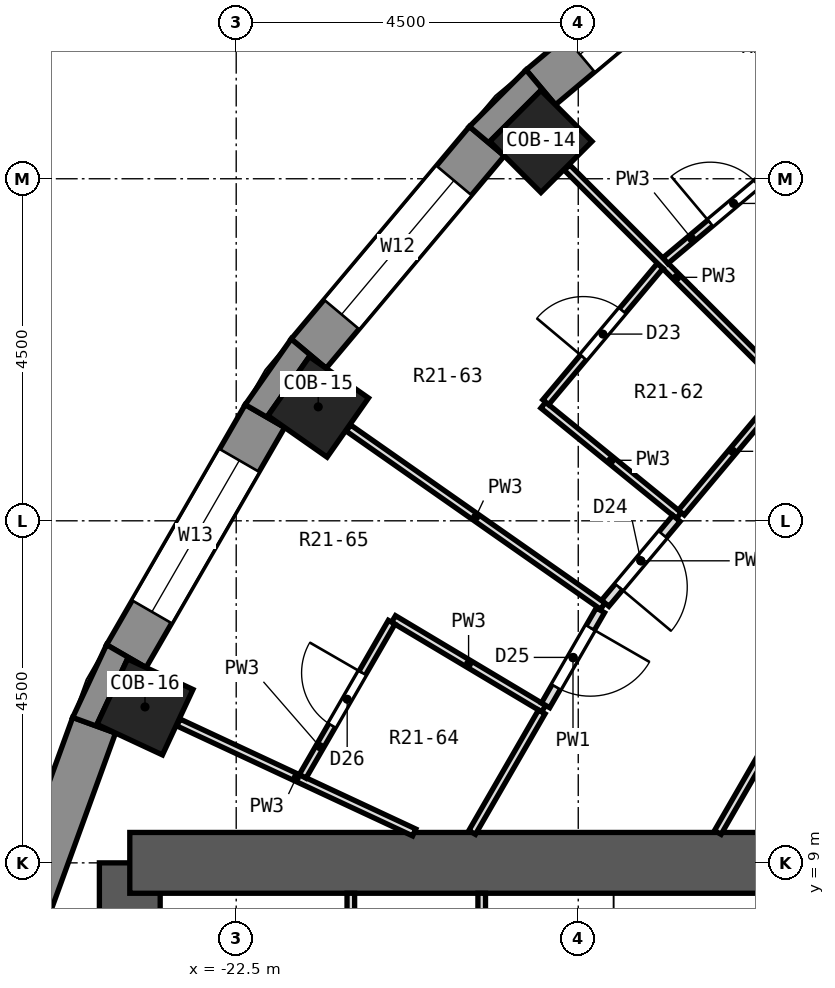
"""IFC4 building model, lengths in metres.
Left out: names, types, materials, properties, quantities, classifications, styles, units other than length and angle.
Written with IfcOpenShell. Run it as: python <this file> out.ifc"""

import sys

from ifc_helpers import new_model, si_unit, direction, frame, frame_2d, origin, origin_2d, place, context, subcontext, project, spatial, polyline, rectangle, outline, extrude, element, fill, save


model = new_model("IFC4")
c1 = context("Model", 3, precision=1e-05, world=origin(), true_north=direction((0.0, 1.0)))
c2 = subcontext(c1, "Body", "Model", "MODEL_VIEW")
j1 = project(units=[si_unit("LENGTHUNIT", "METRE"), si_unit("PLANEANGLEUNIT", "RADIAN")], contexts=[c1])
p1 = place(None, origin())
s1 = spatial("IfcSite", under=j1, at=p1, CompositionType="ELEMENT")
p2 = place(p1, origin())
s2 = spatial("IfcBuilding", under=s1, at=p2, CompositionType="ELEMENT")
p3 = place(p2, frame((0.0, 0.0, 131.5)))
s3 = spatial("IfcBuildingStorey", under=s2, at=p3, CompositionType="ELEMENT", Elevation=131.5)
for number, where, z_axis, x_axis in (
    (1, (-18.491, 18.491, 0.0), (0.0, 0.0, 1.0), (-0.707, 0.707, 0.0)),
    (2, (-21.421, 14.999, 0.0), (0.0, 0.0, 1.0), (-0.819, 0.574, 0.0)),
    (3, (-23.7, 11.052, 0.0), (0.0, 0.0, 1.0), (-0.906, 0.423, 0.0)),
):
    element("IfcColumn", number, at=place(p3, frame(where, z_axis=z_axis, x_axis=x_axis)), inside=s3, PredefinedType="COLUMN", context=c2, shape_type="SweptSolid", body=[
        extrude(rectangle(XDim=0.95, YDim=0.95, at=origin_2d()), origin(), (0.0, 0.0, 1.0), 3.3),
    ])
p4 = place(p3, frame((-23.9, -9.0, 0.0), z_axis=(0.0, 0.0, 1.0), x_axis=(0.0, 1.0, 0.0)))
e4 = element("IfcWall", 4, at=p4, inside=s3, PredefinedType="SHEAR", context=c2, shape_type="SweptSolid", body=[
    extrude(rectangle(XDim=18.0, YDim=0.8, at=frame_2d((9.0, 0.0))), origin(), (0.0, 0.0, 1.0), 3.3),
])
p5 = place(p3, frame((-13.5, 9.0, 0.0), z_axis=(0.0, 0.0, 1.0), x_axis=(-1.0, 0.0, 0.0)))
e5 = element("IfcWall", 5, at=p5, inside=s3, PredefinedType="SHEAR", context=c2, shape_type="SweptSolid", body=[
    extrude(rectangle(XDim=10.4, YDim=0.8, at=frame_2d((5.2, 0.0))), origin(), (0.0, 0.0, 1.0), 3.3),
])
p6 = place(p3, frame((-15.699, 21.547, 0.0), z_axis=(0.0, 0.0, 1.0), x_axis=(-0.766055462616, -0.642774476932, 0.0)))
e6 = element("IfcWall", 6, at=p6, inside=s3, PredefinedType="SOLIDWALL", context=c2, shape_type="SweptSolid", body=[
    extrude(rectangle(XDim=3.648, YDim=0.6, at=frame_2d((1.824, 0.0))), origin(), (0.0, 0.0, 1.0), 2.8),
])
p7 = place(p6, frame((0.674, 0.0, 0.9)))
e7 = element("IfcOpeningElement", 7, at=p7, cuts=e6, PredefinedType="OPENING", context=c2, shape_type="SweptSolid", body=[
    extrude(rectangle(XDim=2.3, YDim=1.8, at=frame_2d((1.15, 0.9))), frame((0.0, 0.312, 0.0), z_axis=(0.0, -1.0, 0.0), x_axis=(1.0, 0.0, 0.0)), (0.0, 0.0, 1.0), 0.624),
])
p8 = place(p3, frame((-19.202, 18.494, 0.0), z_axis=(0.0, 0.0, 1.0), x_axis=(-0.642774476932, -0.766055462616, 0.0)))
e8 = element("IfcWall", 8, at=p8, inside=s3, PredefinedType="SOLIDWALL", context=c2, shape_type="SweptSolid", body=[
    extrude(rectangle(XDim=3.648, YDim=0.6, at=frame_2d((1.824, 0.0))), origin(), (0.0, 0.0, 1.0), 2.8),
])
p9 = place(p8, frame((0.674, 0.0, 0.9)))
e9 = element("IfcOpeningElement", 9, at=p9, cuts=e8, PredefinedType="OPENING", context=c2, shape_type="SweptSolid", body=[
    extrude(rectangle(XDim=2.3, YDim=1.8, at=frame_2d((1.15, 0.9))), frame((0.0, 0.312, 0.0), z_axis=(0.0, -1.0, 0.0), x_axis=(1.0, 0.0, 0.0)), (0.0, 0.0, 1.0), 0.624),
])
p10 = place(p3, frame((-22.122, 14.878, 0.0), z_axis=(0.0, 0.0, 1.0), x_axis=(-0.499954196102, -0.866051847062, 0.0)))
e10 = element("IfcWall", 10, at=p10, inside=s3, PredefinedType="SOLIDWALL", context=c2, shape_type="SweptSolid", body=[
    extrude(rectangle(XDim=3.648, YDim=0.6, at=frame_2d((1.824, 0.0))), origin(), (0.0, 0.0, 1.0), 2.8),
])
p11 = place(p10, frame((0.674, 0.0, 0.9)))
e11 = element("IfcOpeningElement", 11, at=p11, cuts=e10, PredefinedType="OPENING", context=c2, shape_type="SweptSolid", body=[
    extrude(rectangle(XDim=2.3, YDim=1.8, at=frame_2d((1.15, 0.9))), frame((0.0, 0.312, 0.0), z_axis=(0.0, -1.0, 0.0), x_axis=(1.0, 0.0, 0.0)), (0.0, 0.0, 1.0), 0.624),
])
p12 = place(p3, frame((-24.369, 10.811, 0.0), z_axis=(0.0, 0.0, 1.0), x_axis=(-0.341990236633, -0.939703505393, 0.0)))
e12 = element("IfcWall", 12, at=p12, inside=s3, PredefinedType="SOLIDWALL", context=c2, shape_type="SweptSolid", body=[
    extrude(rectangle(XDim=3.648, YDim=0.6, at=frame_2d((1.824, 0.0))), origin(), (0.0, 0.0, 1.0), 2.8),
])
p13 = place(p3, origin())
e13 = element("IfcWall", 13, at=p13, inside=s3, PredefinedType="SOLIDWALL", context=c2, shape_type="SweptSolid", body=[
    extrude(outline(polyline([(-18.686, 19.432), (-19.432, 18.686), (-18.972, 18.301), (-19.163, 18.491), (-18.491, 19.163), (-18.301, 18.972), (-18.686, 19.432)])), origin(), (0.0, 0.0, 1.0), 2.8),
])
p14 = place(p3, origin())
e14 = element("IfcWall", 14, at=p14, inside=s3, PredefinedType="SOLIDWALL", context=c2, shape_type="SweptSolid", body=[
    extrude(outline(polyline([(-22.382, 15.028), (-21.862, 14.728), (-22.083, 14.882), (-21.538, 15.661), (-21.317, 15.506), (-21.777, 15.892), (-22.382, 15.028)])), origin(), (0.0, 0.0, 1.0), 2.8),
])
p15 = place(p3, origin())
e15 = element("IfcWall", 15, at=p15, inside=s3, PredefinedType="SOLIDWALL", context=c2, shape_type="SweptSolid", body=[
    extrude(outline(polyline([(-24.651, 10.913), (-24.087, 10.708), (-24.331, 10.822), (-23.93, 11.683), (-23.686, 11.569), (-24.206, 11.869), (-24.651, 10.913)])), origin(), (0.0, 0.0, 1.0), 2.8),
])
p16 = place(p3, frame((-18.148, 18.148, 0.0), z_axis=(0.0, 0.0, 1.0), x_axis=(0.707106781187, -0.707106781187, 0.0)))
e16 = element("IfcWall", 16, at=p16, inside=s3, PredefinedType="PARTITIONING", context=c2, shape_type="SweptSolid", body=[
    extrude(rectangle(XDim=4.085, YDim=0.1, at=frame_2d((2.043, 0.0))), origin(), (0.0, 0.0, 1.0), 2.8),
])
p17 = place(p3, frame((-18.46, 15.022, 0.0), z_axis=(0.0, 0.0, 1.0), x_axis=(0.775591007639, -0.6312357633, 0.0)))
e17 = element("IfcWall", 17, at=p17, inside=s3, PredefinedType="PARTITIONING", context=c2, shape_type="SweptSolid", body=[
    extrude(rectangle(XDim=2.3, YDim=0.1, at=frame_2d((1.15, 0.0))), origin(), (0.0, 0.0, 1.0), 2.8),
])
p18 = place(p3, frame((-21.024, 14.721, 0.0), z_axis=(0.0, 0.0, 1.0), x_axis=(0.819108383097, -0.573638785945, 0.0)))
e18 = element("IfcWall", 18, at=p18, inside=s3, PredefinedType="PARTITIONING", context=c2, shape_type="SweptSolid", body=[
    extrude(rectangle(XDim=4.086, YDim=0.1, at=frame_2d((2.043, 0.0))), origin(), (0.0, 0.0, 1.0), 2.8),
])
p19 = place(p3, frame((-20.43, 12.209, 0.0), z_axis=(0.0, 0.0, 1.0), x_axis=(0.858446574718, -0.512902991174, 0.0)))
e19 = element("IfcWall", 19, at=p19, inside=s3, PredefinedType="PARTITIONING", context=c2, shape_type="SweptSolid", body=[
    extrude(rectangle(XDim=2.301, YDim=0.1, at=frame_2d((1.15, 0.0))), origin(), (0.0, 0.0, 1.0), 2.8),
])
p20 = place(p3, frame((-23.26, 10.847, 0.0), z_axis=(0.0, 0.0, 1.0), x_axis=(0.906223222272, -0.422799564114, 0.0)))
e20 = element("IfcWall", 20, at=p20, inside=s3, PredefinedType="PARTITIONING", context=c2, shape_type="SweptSolid", body=[
    extrude(rectangle(XDim=3.423, YDim=0.1, at=frame_2d((1.711, 0.0))), origin(), (0.0, 0.0, 1.0), 2.8),
])
p21 = place(p3, frame((-16.853, 16.923, 0.0), z_axis=(0.0, 0.0, 1.0), x_axis=(0.765924716163, 0.642930267735, 0.0)))
e21 = element("IfcWall", 21, at=p21, inside=s3, PredefinedType="PARTITIONING", context=c2, shape_type="SweptSolid", body=[
    extrude(rectangle(XDim=2.34, YDim=0.1, at=frame_2d((1.17, 0.0))), origin(), (0.0, 0.0, 1.0), 2.8),
])
p22 = place(p21, frame((0.77, 0.0, 0.0)))
e22 = element("IfcOpeningElement", 22, at=p22, cuts=e21, PredefinedType="OPENING", context=c2, shape_type="SweptSolid", body=[
    extrude(rectangle(XDim=0.8, YDim=2.1, at=frame_2d((0.4, 1.05))), frame((0.0, 0.062, 0.0), z_axis=(0.0, -1.0, 0.0), x_axis=(1.0, 0.0, 0.0)), (0.0, 0.0, 1.0), 0.124),
])
p23 = place(p3, frame((-16.644, 13.608, 0.0), z_axis=(0.0, 0.0, 1.0), x_axis=(0.642715569181, 0.766104886508, 0.0)))
e23 = element("IfcWall", 23, at=p23, inside=s3, PredefinedType="PARTITIONING", context=c2, shape_type="SweptSolid", body=[
    extrude(rectangle(XDim=2.103, YDim=0.1, at=frame_2d((1.052, 0.0))), origin(), (0.0, 0.0, 1.0), 2.8),
])
p24 = place(p3, frame((-17.645, 12.415, 0.0), z_axis=(0.0, 0.0, 1.0), x_axis=(0.642669367872, 0.766143644233, 0.0)))
e24 = element("IfcWall", 24, at=p24, inside=s3, PredefinedType="PARTITIONING", context=c2, shape_type="SweptSolid", body=[
    extrude(rectangle(XDim=1.457, YDim=0.125, at=frame_2d((0.729, 0.0))), origin(), (0.0, 0.0, 1.0), 2.8),
])
p25 = place(p24, frame((0.279, 0.0, 0.0)))
e25 = element("IfcOpeningElement", 25, at=p25, cuts=e24, PredefinedType="OPENING", context=c2, shape_type="SweptSolid", body=[
    extrude(rectangle(XDim=0.9, YDim=2.1, at=frame_2d((0.45, 1.05))), frame((0.0, 0.074, 0.0), z_axis=(0.0, -1.0, 0.0), x_axis=(1.0, 0.0, 0.0)), (0.0, 0.0, 1.0), 0.149),
])
p26 = place(p3, frame((-18.428, 15.06, 0.0), z_axis=(0.0, 0.0, 1.0), x_axis=(0.642930267735, 0.765924716163, 0.0)))
e26 = element("IfcWall", 26, at=p26, inside=s3, PredefinedType="PARTITIONING", context=c2, shape_type="SweptSolid", body=[
    extrude(rectangle(XDim=2.34, YDim=0.1, at=frame_2d((1.17, 0.0))), origin(), (0.0, 0.0, 1.0), 2.8),
])
p27 = place(p26, frame((0.77, 0.0, 0.0)))
e27 = element("IfcOpeningElement", 27, at=p27, cuts=e26, PredefinedType="OPENING", context=c2, shape_type="SweptSolid", body=[
    extrude(rectangle(XDim=0.8, YDim=2.1, at=frame_2d((0.4, 1.05))), frame((0.0, 0.062, 0.0), z_axis=(0.0, -1.0, 0.0), x_axis=(1.0, 0.0, 0.0)), (0.0, 0.0, 1.0), 0.124),
])
p28 = place(p3, frame((-16.164, 9.4, 0.0), z_axis=(0.0, 0.0, 1.0), x_axis=(0.499750133086, 0.866169616461, 0.0)))
e28 = element("IfcWall", 28, at=p28, inside=s3, PredefinedType="PARTITIONING", context=c2, shape_type="SweptSolid", body=[
    extrude(rectangle(XDim=1.527, YDim=0.1, at=frame_2d((0.764, 0.0))), origin(), (0.0, 0.0, 1.0), 2.8),
])
p29 = place(p3, frame((-19.396, 9.4, 0.0), z_axis=(0.0, 0.0, 1.0), x_axis=(0.500210961829, 0.865903570651, 0.0)))
e29 = element("IfcWall", 29, at=p29, inside=s3, PredefinedType="PARTITIONING", context=c2, shape_type="SweptSolid", body=[
    extrude(rectangle(XDim=1.831, YDim=0.1, at=frame_2d((0.916, 0.0))), origin(), (0.0, 0.0, 1.0), 2.8),
])
p30 = place(p3, frame((-18.43, 11.072, 0.0), z_axis=(0.0, 0.0, 1.0), x_axis=(0.499849317439, 0.866112382925, 0.0)))
e30 = element("IfcWall", 30, at=p30, inside=s3, PredefinedType="PARTITIONING", context=c2, shape_type="SweptSolid", body=[
    extrude(rectangle(XDim=1.444, YDim=0.125, at=frame_2d((0.722, 0.0))), origin(), (0.0, 0.0, 1.0), 2.8),
])
p31 = place(p30, frame((0.278, 0.0, 0.0)))
e31 = element("IfcOpeningElement", 31, at=p31, cuts=e30, PredefinedType="OPENING", context=c2, shape_type="SweptSolid", body=[
    extrude(rectangle(XDim=0.9, YDim=2.1, at=frame_2d((0.45, 1.05))), frame((0.0, 0.074, 0.0), z_axis=(0.0, -1.0, 0.0), x_axis=(1.0, 0.0, 0.0)), (0.0, 0.0, 1.0), 0.149),
])
p32 = place(p3, frame((-21.625, 10.139, 0.0), z_axis=(0.0, 0.0, 1.0), x_axis=(0.499999433879, 0.866025730634, 0.0)))
e32 = element("IfcWall", 32, at=p32, inside=s3, PredefinedType="PARTITIONING", context=c2, shape_type="SweptSolid", body=[
    extrude(rectangle(XDim=2.34, YDim=0.1, at=frame_2d((1.17, 0.0))), origin(), (0.0, 0.0, 1.0), 2.8),
])
p33 = place(p32, frame((0.77, 0.0, 0.0)))
e33 = element("IfcOpeningElement", 33, at=p33, cuts=e32, PredefinedType="OPENING", context=c2, shape_type="SweptSolid", body=[
    extrude(rectangle(XDim=0.8, YDim=2.1, at=frame_2d((0.4, 1.05))), frame((0.0, 0.062, 0.0), z_axis=(0.0, -1.0, 0.0), x_axis=(1.0, 0.0, 0.0)), (0.0, 0.0, 1.0), 0.124),
])
p34 = place(p3, frame((-19.27, 5.25, 0.0), z_axis=(0.0, 0.0, 1.0), x_axis=(0.0, 1.0, 0.0)))
e34 = element("IfcWall", 34, at=p34, inside=s3, PredefinedType="PARTITIONING", context=c2, shape_type="SweptSolid", body=[
    extrude(rectangle(XDim=3.35, YDim=0.1, at=frame_2d((1.675, 0.0))), origin(), (0.0, 0.0, 1.0), 2.8),
])
p35 = place(p3, frame((-20.992, 5.25, 0.0), z_axis=(0.0, 0.0, 1.0), x_axis=(0.0, 1.0, 0.0)))
e35 = element("IfcWall", 35, at=p35, inside=s3, PredefinedType="PARTITIONING", context=c2, shape_type="SweptSolid", body=[
    extrude(rectangle(XDim=3.35, YDim=0.1, at=frame_2d((1.675, 0.0))), origin(), (0.0, 0.0, 1.0), 2.8),
])
p36 = place(p35, frame((1.225, 0.0, 0.0)))
e36 = element("IfcOpeningElement", 36, at=p36, cuts=e35, PredefinedType="OPENING", context=c2, shape_type="SweptSolid", body=[
    extrude(rectangle(XDim=0.9, YDim=2.1, at=frame_2d((0.45, 1.05))), frame((0.0, 0.062, 0.0), z_axis=(0.0, -1.0, 0.0), x_axis=(1.0, 0.0, 0.0)), (0.0, 0.0, 1.0), 0.124),
])
p37 = place(p7, origin())
e37 = element("IfcWindow", 37, at=p37, inside=s3, PartitioningType="SINGLE_PANEL", PredefinedType="WINDOW", context=c2, shape_type="SweptSolid", body=[
    extrude(rectangle(XDim=2.3, YDim=1.8, at=frame_2d((1.15, 0.9))), frame((0.0, 0.18, 0.0), z_axis=(0.0, -1.0, 0.0), x_axis=(1.0, 0.0, 0.0)), (0.0, 0.0, 1.0), 0.06),
])
fill(e7, e37)
p38 = place(p9, origin())
e38 = element("IfcWindow", 38, at=p38, inside=s3, PartitioningType="SINGLE_PANEL", PredefinedType="WINDOW", context=c2, shape_type="SweptSolid", body=[
    extrude(rectangle(XDim=2.3, YDim=1.8, at=frame_2d((1.15, 0.9))), frame((0.0, 0.18, 0.0), z_axis=(0.0, -1.0, 0.0), x_axis=(1.0, 0.0, 0.0)), (0.0, 0.0, 1.0), 0.06),
])
fill(e9, e38)
p39 = place(p11, origin())
e39 = element("IfcWindow", 39, at=p39, inside=s3, PartitioningType="SINGLE_PANEL", PredefinedType="WINDOW", context=c2, shape_type="SweptSolid", body=[
    extrude(rectangle(XDim=2.3, YDim=1.8, at=frame_2d((1.15, 0.9))), frame((0.0, 0.18, 0.0), z_axis=(0.0, -1.0, 0.0), x_axis=(1.0, 0.0, 0.0)), (0.0, 0.0, 1.0), 0.06),
])
fill(e11, e39)
p40 = place(p22, origin())
e40 = element("IfcDoor", 40, at=p40, inside=s3, OperationType="SINGLE_SWING_LEFT", PredefinedType="DOOR", context=c2, shape_type="SweptSolid", body=[
    extrude(rectangle(XDim=0.8, YDim=2.1, at=frame_2d((0.4, 1.05))), frame((0.0, 0.025, 0.0), z_axis=(0.0, -1.0, 0.0), x_axis=(1.0, 0.0, 0.0)), (0.0, 0.0, 1.0), 0.05),
])
fill(e22, e40)
p41 = place(p27, origin())
e41 = element("IfcDoor", 41, at=p41, inside=s3, OperationType="SINGLE_SWING_LEFT", PredefinedType="DOOR", context=c2, shape_type="SweptSolid", body=[
    extrude(rectangle(XDim=0.8, YDim=2.1, at=frame_2d((0.4, 1.05))), frame((0.0, 0.025, 0.0), z_axis=(0.0, -1.0, 0.0), x_axis=(1.0, 0.0, 0.0)), (0.0, 0.0, 1.0), 0.05),
])
fill(e27, e41)
p42 = place(p25, frame((0.9, 0.0, 0.0), z_axis=(0.0, 0.0, 1.0), x_axis=(-1.0, 0.0, 0.0)))
e42 = element("IfcDoor", 42, at=p42, inside=s3, OperationType="SINGLE_SWING_RIGHT", PredefinedType="DOOR", context=c2, shape_type="SweptSolid", body=[
    extrude(rectangle(XDim=0.9, YDim=2.1, at=frame_2d((0.45, 1.05))), frame((0.0, 0.025, 0.0), z_axis=(0.0, -1.0, 0.0), x_axis=(1.0, 0.0, 0.0)), (0.0, 0.0, 1.0), 0.05),
])
fill(e25, e42)
p43 = place(p31, frame((0.9, 0.0, 0.0), z_axis=(0.0, 0.0, 1.0), x_axis=(-1.0, 0.0, 0.0)))
e43 = element("IfcDoor", 43, at=p43, inside=s3, OperationType="SINGLE_SWING_LEFT", PredefinedType="DOOR", context=c2, shape_type="SweptSolid", body=[
    extrude(rectangle(XDim=0.9, YDim=2.1, at=frame_2d((0.45, 1.05))), frame((0.0, 0.025, 0.0), z_axis=(0.0, -1.0, 0.0), x_axis=(1.0, 0.0, 0.0)), (0.0, 0.0, 1.0), 0.05),
])
fill(e31, e43)
p44 = place(p33, origin())
e44 = element("IfcDoor", 44, at=p44, inside=s3, OperationType="SINGLE_SWING_RIGHT", PredefinedType="DOOR", context=c2, shape_type="SweptSolid", body=[
    extrude(rectangle(XDim=0.8, YDim=2.1, at=frame_2d((0.4, 1.05))), frame((0.0, 0.025, 0.0), z_axis=(0.0, -1.0, 0.0), x_axis=(1.0, 0.0, 0.0)), (0.0, 0.0, 1.0), 0.05),
])
fill(e33, e44)
save(model, sys.argv[1])
